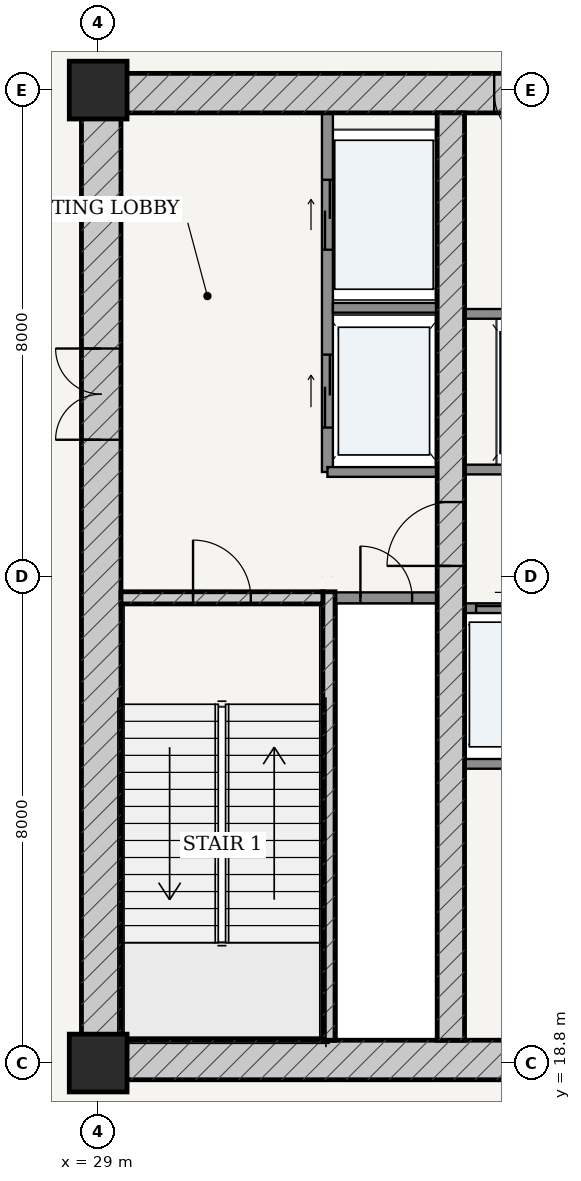
"""IFC4 building model, lengths in metres.
Left out: names, types, materials, properties, quantities, classifications, styles, units other than length and angle.
Written with IfcOpenShell. Run it as: python <this file> out.ifc"""

import sys

from ifc_helpers import new_model, si_unit, direction, frame, frame_2d, origin, origin_2d, place, context, subcontext, project, spatial, rectangle, extrude, source, transform, mapped, element, fill, save


model = new_model("IFC4")
c1 = context("Model", 3, precision=1e-05, world=origin(), true_north=direction((-0.2419218956, 0.970295726276)))
c2 = subcontext(c1, "Body", "Model", "MODEL_VIEW")
j1 = project(units=[si_unit("LENGTHUNIT", "METRE"), si_unit("PLANEANGLEUNIT", "RADIAN")], contexts=[c1])
p1 = place(None, origin())
s1 = spatial("IfcSite", under=j1, at=p1, CompositionType="ELEMENT")
p2 = place(p1, origin())
s2 = spatial("IfcBuilding", under=s1, at=p2, CompositionType="ELEMENT")
p3 = place(p2, frame((0.0, 0.0, 130.2)))
s3 = spatial("IfcBuildingStorey", under=s2, at=p3, CompositionType="ELEMENT", Elevation=130.2)
for number, where, z_axis, x_axis in (
    (1, (29.0, 18.8, 0.0), (0.0, 0.0, 1.0), (1.0, 0.0, 0.0)),
    (2, (29.0, 34.8, 0.0), (0.0, 0.0, 1.0), (1.0, 0.0, 0.0)),
):
    element("IfcColumn", number, at=place(p3, frame(where, z_axis=z_axis, x_axis=x_axis)), inside=s3, PredefinedType="COLUMN", context=c2, shape_type="SweptSolid", body=[
        extrude(rectangle(XDim=0.95, YDim=0.95, at=origin_2d()), origin(), (0.0, 0.0, 1.0), 5.2),
    ])
p4 = place(p3, frame((28.725, 18.85, 0.0), z_axis=(0.0, 0.0, 1.0), x_axis=(1.0, 0.0, 0.0)))
e3 = element("IfcWall", 3, at=p4, inside=s3, PredefinedType="SHEAR", context=c2, shape_type="SweptSolid", body=[
    extrude(rectangle(XDim=18.55, YDim=0.65, at=frame_2d((9.275, 0.0))), origin(), (0.0, 0.0, 1.0), 4.93),
])
p5 = place(p4, frame((7.528, 0.0, 0.0)))
e4 = element("IfcOpeningElement", 4, at=p5, cuts=e3, PredefinedType="OPENING", context=c2, shape_type="SweptSolid", body=[
    extrude(rectangle(XDim=0.85, YDim=2.1, at=frame_2d((0.425, 1.05))), frame((0.0, 0.335, 0.0), z_axis=(0.0, -1.0, 0.0), x_axis=(1.0, 0.0, 0.0)), (0.0, 0.0, 1.0), 0.67),
])
p6 = place(p4, frame((10.573, 0.0, 0.0)))
e5 = element("IfcOpeningElement", 5, at=p6, cuts=e3, PredefinedType="OPENING", context=c2, shape_type="SweptSolid", body=[
    extrude(rectangle(XDim=0.85, YDim=2.1, at=frame_2d((0.425, 1.05))), frame((0.0, 0.335, 0.0), z_axis=(0.0, -1.0, 0.0), x_axis=(1.0, 0.0, 0.0)), (0.0, 0.0, 1.0), 0.67),
])
p7 = place(p3, frame((28.725, 34.75, 0.0), z_axis=(0.0, 0.0, 1.0), x_axis=(1.0, 0.0, 0.0)))
e6 = element("IfcWall", 6, at=p7, inside=s3, PredefinedType="SHEAR", context=c2, shape_type="SweptSolid", body=[
    extrude(rectangle(XDim=18.55, YDim=0.65, at=frame_2d((9.275, 0.0))), origin(), (0.0, 0.0, 1.0), 4.93),
])
p8 = place(p7, frame((6.788, 0.0, 0.0)))
e7 = element("IfcOpeningElement", 7, at=p8, cuts=e6, PredefinedType="OPENING", context=c2, shape_type="SweptSolid", body=[
    extrude(rectangle(XDim=0.85, YDim=2.1, at=frame_2d((0.425, 1.05))), frame((0.0, 0.335, 0.0), z_axis=(0.0, -1.0, 0.0), x_axis=(1.0, 0.0, 0.0)), (0.0, 0.0, 1.0), 0.67),
])
p9 = place(p7, frame((8.845, 0.0, 0.0)))
e8 = element("IfcOpeningElement", 8, at=p9, cuts=e6, PredefinedType="OPENING", context=c2, shape_type="SweptSolid", body=[
    extrude(rectangle(XDim=0.86, YDim=2.1, at=frame_2d((0.43, 1.05))), frame((0.0, 0.335, 0.0), z_axis=(0.0, -1.0, 0.0), x_axis=(1.0, 0.0, 0.0)), (0.0, 0.0, 1.0), 0.67),
])
p10 = place(p7, frame((10.913, 0.0, 0.0)))
e9 = element("IfcOpeningElement", 9, at=p10, cuts=e6, PredefinedType="OPENING", context=c2, shape_type="SweptSolid", body=[
    extrude(rectangle(XDim=0.85, YDim=2.1, at=frame_2d((0.425, 1.05))), frame((0.0, 0.335, 0.0), z_axis=(0.0, -1.0, 0.0), x_axis=(1.0, 0.0, 0.0)), (0.0, 0.0, 1.0), 0.67),
])
p11 = place(p3, frame((29.05, 19.175, 0.0), z_axis=(0.0, 0.0, 1.0), x_axis=(0.0, 1.0, 0.0)))
e10 = element("IfcWall", 10, at=p11, inside=s3, PredefinedType="SHEAR", context=c2, shape_type="SweptSolid", body=[
    extrude(rectangle(XDim=15.25, YDim=0.65, at=frame_2d((7.625, 0.0))), origin(), (0.0, 0.0, 1.0), 4.93),
])
p12 = place(p11, frame((9.875, 0.0, 0.0)))
e11 = element("IfcOpeningElement", 11, at=p12, cuts=e10, PredefinedType="OPENING", context=c2, shape_type="SweptSolid", body=[
    extrude(rectangle(XDim=1.5, YDim=2.2, at=frame_2d((0.75, 1.1))), frame((0.0, 0.335, 0.0), z_axis=(0.0, -1.0, 0.0), x_axis=(1.0, 0.0, 0.0)), (0.0, 0.0, 1.0), 0.67),
])
p13 = place(p3, frame((32.795, 19.175, 0.0), z_axis=(0.0, 0.0, 1.0), x_axis=(0.0, 1.0, 0.0)))
e12 = element("IfcWall", 12, at=p13, inside=s3, PredefinedType="SOLIDWALL", context=c2, shape_type="SweptSolid", body=[
    extrude(rectangle(XDim=7.375, YDim=0.2, at=frame_2d((3.688, 0.0))), origin(), (0.0, 0.0, 1.0), 4.93),
])
p14 = place(p3, frame((29.375, 26.45, 0.0), z_axis=(0.0, 0.0, 1.0), x_axis=(1.0, 0.0, 0.0)))
e13 = element("IfcWall", 13, at=p14, inside=s3, PredefinedType="SOLIDWALL", context=c2, shape_type="SweptSolid", body=[
    extrude(rectangle(XDim=3.32, YDim=0.2, at=frame_2d((1.66, 0.0))), origin(), (0.0, 0.0, 1.0), 4.93),
])
p15 = place(p14, frame((1.185, 0.0, 0.0)))
e14 = element("IfcOpeningElement", 14, at=p15, cuts=e13, PredefinedType="OPENING", context=c2, shape_type="SweptSolid", body=[
    extrude(rectangle(XDim=0.95, YDim=2.15, at=frame_2d((0.475, 1.075))), frame((0.0, 0.11, 0.0), z_axis=(0.0, -1.0, 0.0), x_axis=(1.0, 0.0, 0.0)), (0.0, 0.0, 1.0), 0.22),
])
p16 = place(p3, frame((34.8, 19.175, 0.0), z_axis=(0.0, 0.0, 1.0), x_axis=(0.0, 1.0, 0.0)))
e15 = element("IfcWall", 15, at=p16, inside=s3, PredefinedType="SHEAR", context=c2, shape_type="SweptSolid", body=[
    extrude(rectangle(XDim=15.25, YDim=0.45, at=frame_2d((7.625, 0.0))), origin(), (0.0, 0.0, 1.0), 4.93),
])
p17 = place(p16, frame((7.8, 0.0, 0.0)))
e16 = element("IfcOpeningElement", 16, at=p17, cuts=e15, PredefinedType="OPENING", context=c2, shape_type="SweptSolid", body=[
    extrude(rectangle(XDim=1.05, YDim=2.15, at=frame_2d((0.525, 1.075))), frame((0.0, 0.235, 0.0), z_axis=(0.0, -1.0, 0.0), x_axis=(1.0, 0.0, 0.0)), (0.0, 0.0, 1.0), 0.47),
])
p18 = place(p3, frame((32.9, 26.45, 0.0), z_axis=(0.0, 0.0, 1.0), x_axis=(1.0, 0.0, 0.0)))
e17 = element("IfcWall", 17, at=p18, inside=s3, PredefinedType="PARTITIONING", context=c2, shape_type="SweptSolid", body=[
    extrude(rectangle(XDim=1.675, YDim=0.18, at=frame_2d((0.837, 0.0))), origin(), (0.0, 0.0, 1.0), 4.93),
])
p19 = place(p18, frame((0.413, 0.0, 0.0)))
e18 = element("IfcOpeningElement", 18, at=p19, cuts=e17, PredefinedType="OPENING", context=c2, shape_type="SweptSolid", body=[
    extrude(rectangle(XDim=0.85, YDim=2.1, at=frame_2d((0.425, 1.05))), frame((0.0, 0.1, 0.0), z_axis=(0.0, -1.0, 0.0), x_axis=(1.0, 0.0, 0.0)), (0.0, 0.0, 1.0), 0.2),
])
p20 = place(p3, frame((32.77, 28.52, 0.0), z_axis=(0.0, 0.0, 1.0), x_axis=(0.0, 1.0, 0.0)))
e19 = element("IfcWall", 19, at=p20, inside=s3, PredefinedType="PARTITIONING", context=c2, shape_type="SweptSolid", body=[
    extrude(rectangle(XDim=5.905, YDim=0.18, at=frame_2d((2.953, 0.0))), origin(), (0.0, 0.0, 1.0), 4.93),
])
p21 = place(p20, frame((3.655, 0.0, 0.0)))
e20 = element("IfcOpeningElement", 20, at=p21, cuts=e19, PredefinedType="OPENING", context=c2, shape_type="SweptSolid", body=[
    extrude(rectangle(XDim=1.15, YDim=2.2, at=frame_2d((0.575, 1.1))), frame((0.0, 0.1, 0.0), z_axis=(0.0, -1.0, 0.0), x_axis=(1.0, 0.0, 0.0)), (0.0, 0.0, 1.0), 0.2),
])
p22 = place(p20, frame((0.73, 0.0, 0.0)))
e21 = element("IfcOpeningElement", 21, at=p22, cuts=e19, PredefinedType="OPENING", context=c2, shape_type="SweptSolid", body=[
    extrude(rectangle(XDim=1.2, YDim=2.25, at=frame_2d((0.6, 1.125))), frame((0.0, 0.1, 0.0), z_axis=(0.0, -1.0, 0.0), x_axis=(1.0, 0.0, 0.0)), (0.0, 0.0, 1.0), 0.2),
])
p23 = place(p3, frame((32.86, 31.22, 0.0), z_axis=(0.0, 0.0, 1.0), x_axis=(1.0, 0.0, 0.0)))
e22 = element("IfcWall", 22, at=p23, inside=s3, PredefinedType="PARTITIONING", context=c2, shape_type="SweptSolid", body=[
    extrude(rectangle(XDim=1.715, YDim=0.16, at=frame_2d((0.857, 0.0))), origin(), (0.0, 0.0, 1.0), 4.93),
])
p24 = place(p3, frame((32.77, 28.52, 0.0), z_axis=(0.0, 0.0, 1.0), x_axis=(1.0, 0.0, 0.0)))
e23 = element("IfcWall", 23, at=p24, inside=s3, PredefinedType="PARTITIONING", context=c2, shape_type="SweptSolid", body=[
    extrude(rectangle(XDim=1.805, YDim=0.16, at=frame_2d((0.902, 0.0))), origin(), (0.0, 0.0, 1.0), 4.93),
])
p25 = place(p3, frame((35.025, 28.56, 0.0), z_axis=(0.0, 0.0, 1.0), x_axis=(1.0, 0.0, 0.0)))
e24 = element("IfcWall", 24, at=p25, inside=s3, PredefinedType="PARTITIONING", context=c2, shape_type="SweptSolid", body=[
    extrude(rectangle(XDim=5.95, YDim=0.16, at=frame_2d((2.975, 0.0))), origin(), (0.0, 0.0, 1.0), 4.93),
])
p26 = place(p25, frame((0.76, 0.0, 0.0)))
e25 = element("IfcOpeningElement", 25, at=p26, cuts=e24, PredefinedType="OPENING", context=c2, shape_type="SweptSolid", body=[
    extrude(rectangle(XDim=1.1, YDim=2.2, at=frame_2d((0.55, 1.1))), frame((0.0, 0.09, 0.0), z_axis=(0.0, -1.0, 0.0), x_axis=(1.0, 0.0, 0.0)), (0.0, 0.0, 1.0), 0.18),
])
p27 = place(p25, frame((2.425, 0.0, 0.0)))
e26 = element("IfcOpeningElement", 26, at=p27, cuts=e24, PredefinedType="OPENING", context=c2, shape_type="SweptSolid", body=[
    extrude(rectangle(XDim=1.1, YDim=2.2, at=frame_2d((0.55, 1.1))), frame((0.0, 0.09, 0.0), z_axis=(0.0, -1.0, 0.0), x_axis=(1.0, 0.0, 0.0)), (0.0, 0.0, 1.0), 0.18),
])
p28 = place(p25, frame((4.09, 0.0, 0.0)))
e27 = element("IfcOpeningElement", 27, at=p28, cuts=e24, PredefinedType="OPENING", context=c2, shape_type="SweptSolid", body=[
    extrude(rectangle(XDim=1.1, YDim=2.2, at=frame_2d((0.55, 1.1))), frame((0.0, 0.09, 0.0), z_axis=(0.0, -1.0, 0.0), x_axis=(1.0, 0.0, 0.0)), (0.0, 0.0, 1.0), 0.18),
])
p29 = place(p3, frame((35.025, 31.12, 0.0), z_axis=(0.0, 0.0, 1.0), x_axis=(1.0, 0.0, 0.0)))
e28 = element("IfcWall", 28, at=p29, inside=s3, PredefinedType="PARTITIONING", context=c2, shape_type="SweptSolid", body=[
    extrude(rectangle(XDim=5.95, YDim=0.16, at=frame_2d((2.975, 0.0))), origin(), (0.0, 0.0, 1.0), 4.93),
])
p30 = place(p3, frame((35.025, 26.28, 0.0), z_axis=(0.0, 0.0, 1.0), x_axis=(1.0, 0.0, 0.0)))
e29 = element("IfcWall", 29, at=p30, inside=s3, PredefinedType="PARTITIONING", context=c2, shape_type="SweptSolid", body=[
    extrude(rectangle(XDim=5.95, YDim=0.16, at=frame_2d((2.975, 0.0))), origin(), (0.0, 0.0, 1.0), 4.93),
])
p31 = place(p30, frame((0.19, 0.0, 0.0)))
e30 = element("IfcOpeningElement", 30, at=p31, cuts=e29, PredefinedType="OPENING", context=c2, shape_type="SweptSolid", body=[
    extrude(rectangle(XDim=1.1, YDim=2.2, at=frame_2d((0.55, 1.1))), frame((0.0, 0.09, 0.0), z_axis=(0.0, -1.0, 0.0), x_axis=(1.0, 0.0, 0.0)), (0.0, 0.0, 1.0), 0.18),
])
p32 = place(p30, frame((1.67, 0.0, 0.0)))
e31 = element("IfcOpeningElement", 31, at=p32, cuts=e29, PredefinedType="OPENING", context=c2, shape_type="SweptSolid", body=[
    extrude(rectangle(XDim=1.1, YDim=2.2, at=frame_2d((0.55, 1.1))), frame((0.0, 0.09, 0.0), z_axis=(0.0, -1.0, 0.0), x_axis=(1.0, 0.0, 0.0)), (0.0, 0.0, 1.0), 0.18),
])
p33 = place(p30, frame((3.18, 0.0, 0.0)))
e32 = element("IfcOpeningElement", 32, at=p33, cuts=e29, PredefinedType="OPENING", context=c2, shape_type="SweptSolid", body=[
    extrude(rectangle(XDim=1.1, YDim=2.2, at=frame_2d((0.55, 1.1))), frame((0.0, 0.09, 0.0), z_axis=(0.0, -1.0, 0.0), x_axis=(1.0, 0.0, 0.0)), (0.0, 0.0, 1.0), 0.18),
])
p34 = place(p30, frame((4.66, 0.0, 0.0)))
e33 = element("IfcOpeningElement", 33, at=p34, cuts=e29, PredefinedType="OPENING", context=c2, shape_type="SweptSolid", body=[
    extrude(rectangle(XDim=1.1, YDim=2.2, at=frame_2d((0.55, 1.1))), frame((0.0, 0.09, 0.0), z_axis=(0.0, -1.0, 0.0), x_axis=(1.0, 0.0, 0.0)), (0.0, 0.0, 1.0), 0.18),
])
p35 = place(p3, frame((35.025, 23.72, 0.0), z_axis=(0.0, 0.0, 1.0), x_axis=(1.0, 0.0, 0.0)))
e34 = element("IfcWall", 34, at=p35, inside=s3, PredefinedType="PARTITIONING", context=c2, shape_type="SweptSolid", body=[
    extrude(rectangle(XDim=5.95, YDim=0.16, at=frame_2d((2.975, 0.0))), origin(), (0.0, 0.0, 1.0), 4.93),
])
m1 = source(origin(), c2, "Body", "SweptSolid", [
    extrude(rectangle(XDim=1.5, YDim=2.2, at=frame_2d((0.75, 1.1))), frame((0.0, 0.025, 0.0), z_axis=(0.0, -1.0, 0.0), x_axis=(1.0, 0.0, 0.0)), (0.0, 0.0, 1.0), 0.05),
])
p36 = place(p12, origin())
e35 = element("IfcDoor", 35, at=p36, inside=s3, OperationType="DOUBLE_DOOR_SINGLE_SWING", PredefinedType="DOOR", context=c2, shape_type="MappedRepresentation", body=[
    mapped(m1, transform((0.0, 0.0, 0.0), scale=1.0)),
])
fill(e11, e35)
m2 = source(origin(), c2, "Body", "SweptSolid", [
    extrude(rectangle(XDim=1.05, YDim=2.15, at=frame_2d((0.525, 1.075))), frame((0.0, 0.025, 0.0), z_axis=(0.0, -1.0, 0.0), x_axis=(1.0, 0.0, 0.0)), (0.0, 0.0, 1.0), 0.05),
])
p37 = place(p17, origin())
e36 = element("IfcDoor", 36, at=p37, inside=s3, OperationType="SINGLE_SWING_LEFT", PredefinedType="DOOR", context=c2, shape_type="MappedRepresentation", body=[
    mapped(m2, transform((0.0, 0.0, 0.0), scale=1.0)),
])
fill(e16, e36)
m3 = source(origin(), c2, "Body", "SweptSolid", [
    extrude(rectangle(XDim=0.95, YDim=2.15, at=frame_2d((0.475, 1.075))), frame((0.0, 0.025, 0.0), z_axis=(0.0, -1.0, 0.0), x_axis=(1.0, 0.0, 0.0)), (0.0, 0.0, 1.0), 0.05),
])
p38 = place(p15, origin())
e37 = element("IfcDoor", 37, at=p38, inside=s3, OperationType="SINGLE_SWING_LEFT", PredefinedType="DOOR", context=c2, shape_type="MappedRepresentation", body=[
    mapped(m3, transform((0.0, 0.0, 0.0), scale=1.0)),
])
fill(e14, e37)
m4 = source(origin(), c2, "Body", "SweptSolid", [
    extrude(rectangle(XDim=0.85, YDim=2.1, at=frame_2d((0.425, 1.05))), frame((0.0, 0.025, 0.0), z_axis=(0.0, -1.0, 0.0), x_axis=(1.0, 0.0, 0.0)), (0.0, 0.0, 1.0), 0.05),
])
p39 = place(p19, origin())
e38 = element("IfcDoor", 38, at=p39, inside=s3, OperationType="SINGLE_SWING_LEFT", PredefinedType="DOOR", context=c2, shape_type="MappedRepresentation", body=[
    mapped(m4, transform((0.0, 0.0, 0.0), scale=1.0)),
])
fill(e18, e38)
p40 = place(p8, frame((0.85, 0.0, 0.0), z_axis=(0.0, 0.0, 1.0), x_axis=(-1.0, 0.0, 0.0)))
e39 = element("IfcDoor", 39, at=p40, inside=s3, OperationType="SINGLE_SWING_LEFT", PredefinedType="DOOR", context=c2, shape_type="MappedRepresentation", body=[
    mapped(m4, transform((0.0, 0.0, 0.0), scale=1.0)),
])
fill(e7, e39)
m5 = source(origin(), c2, "Body", "SweptSolid", [
    extrude(rectangle(XDim=1.15, YDim=2.2, at=frame_2d((0.575, 1.1))), frame((0.0, 0.025, 0.0), z_axis=(0.0, -1.0, 0.0), x_axis=(1.0, 0.0, 0.0)), (0.0, 0.0, 1.0), 0.05),
])
p41 = place(p21, origin())
e40 = element("IfcDoor", 40, at=p41, inside=s3, OperationType="DOUBLE_DOOR_SLIDING", PredefinedType="DOOR", context=c2, shape_type="MappedRepresentation", body=[
    mapped(m5, transform((0.0, 0.0, 0.0), scale=1.0)),
])
fill(e20, e40)
m6 = source(origin(), c2, "Body", "SweptSolid", [
    extrude(rectangle(XDim=1.2, YDim=2.25, at=frame_2d((0.6, 1.125))), frame((0.0, 0.025, 0.0), z_axis=(0.0, -1.0, 0.0), x_axis=(1.0, 0.0, 0.0)), (0.0, 0.0, 1.0), 0.05),
])
p42 = place(p22, origin())
e41 = element("IfcDoor", 41, at=p42, inside=s3, OperationType="DOUBLE_DOOR_SLIDING", PredefinedType="DOOR", context=c2, shape_type="MappedRepresentation", body=[
    mapped(m6, transform((0.0, 0.0, 0.0), scale=1.0)),
])
fill(e21, e41)
m7 = source(origin(), c2, "Body", "SweptSolid", [
    extrude(rectangle(XDim=1.1, YDim=2.2, at=frame_2d((0.55, 1.1))), frame((0.0, 0.025, 0.0), z_axis=(0.0, -1.0, 0.0), x_axis=(1.0, 0.0, 0.0)), (0.0, 0.0, 1.0), 0.05),
])
p43 = place(p31, origin())
e42 = element("IfcDoor", 42, at=p43, inside=s3, OperationType="DOUBLE_DOOR_SLIDING", PredefinedType="DOOR", context=c2, shape_type="MappedRepresentation", body=[
    mapped(m7, transform((0.0, 0.0, 0.0), scale=1.0)),
])
fill(e30, e42)
save(model, sys.argv[1])
